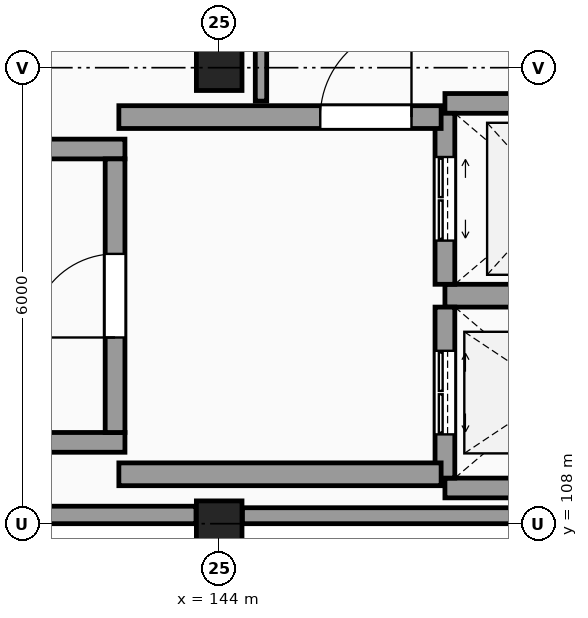
"""IFC4 building model, lengths in metres.
Left out: names, types, materials, properties, quantities, classifications, styles, units other than length and angle.
Written with IfcOpenShell. Run it as: python <this file> out.ifc"""

import sys

from ifc_helpers import new_model, si_unit, direction, frame, frame_2d, origin, origin_2d, place, context, subcontext, project, spatial, rectangle, extrude, element, fill, save


model = new_model("IFC4")
c1 = context("Model", 3, precision=1e-05, world=origin(), true_north=direction((0.0, 1.0)))
c2 = subcontext(c1, "Body", "Model", "MODEL_VIEW")
j1 = project(units=[si_unit("LENGTHUNIT", "METRE"), si_unit("PLANEANGLEUNIT", "RADIAN")], contexts=[c1])
p1 = place(None, origin())
s1 = spatial("IfcSite", under=j1, at=p1, CompositionType="ELEMENT")
p2 = place(p1, origin())
s2 = spatial("IfcBuilding", under=s1, at=p2, CompositionType="ELEMENT")
p3 = place(p2, frame((0.0, 0.0, 34.8)))
s3 = spatial("IfcBuildingStorey", under=s2, at=p3, CompositionType="ELEMENT", Elevation=34.8)
for number, where, z_axis, x_axis in (
    (1, (144.0, 108.0, 0.0), (0.0, 0.0, 1.0), (1.0, 0.0, 0.0)),
    (2, (144.0, 114.0, 0.0), (0.0, 0.0, 1.0), (1.0, 0.0, 0.0)),
):
    element("IfcColumn", number, at=place(p3, frame(where, z_axis=z_axis, x_axis=x_axis)), inside=s3, PredefinedType="COLUMN", context=c2, shape_type="SweptSolid", body=[
        extrude(rectangle(XDim=0.6, YDim=0.6, at=origin_2d()), origin(), (0.0, 0.0, 1.0), 3.3),
    ])
p4 = place(p3, frame((138.28, 108.115, 0.0), z_axis=(0.0, 0.0, 1.0), x_axis=(1.0, 0.0, 0.0)))
e3 = element("IfcWall", 3, at=p4, inside=s3, PredefinedType="SOLIDWALL", context=c2, shape_type="SweptSolid", body=[
    extrude(rectangle(XDim=5.415, YDim=0.23, at=frame_2d((2.708, 0.0))), origin(), (0.0, 0.0, 1.0), 2.42),
])
p5 = place(p3, frame((144.305, 108.105, 0.0), z_axis=(0.0, 0.0, 1.0), x_axis=(1.0, 0.0, 0.0)))
e4 = element("IfcWall", 4, at=p5, inside=s3, PredefinedType="SOLIDWALL", context=c2, shape_type="SweptSolid", body=[
    extrude(rectangle(XDim=5.415, YDim=0.21, at=frame_2d((2.708, 0.0))), origin(), (0.0, 0.0, 1.0), 2.42),
])
for number, where, z_axis, x_axis in (
    (5, (132.04, 109.07, 0.0), (0.0, 0.0, 1.0), (1.0, 0.0, 0.0)),
    (6, (132.04, 112.93, 0.0), (0.0, 0.0, 1.0), (1.0, 0.0, 0.0)),
):
    element("IfcWall", number, at=place(p3, frame(where, z_axis=z_axis, x_axis=x_axis)), inside=s3, PredefinedType="SHEAR", context=c2, shape_type="SweptSolid", body=[
        extrude(rectangle(XDim=10.72, YDim=0.26, at=frame_2d((5.36, 0.0))), origin(), (0.0, 0.0, 1.0), 3.3),
    ])
p6 = place(p3, frame((142.63, 109.2, 0.0), z_axis=(0.0, 0.0, 1.0), x_axis=(0.0, 1.0, 0.0)))
e7 = element("IfcWall", 7, at=p6, inside=s3, PredefinedType="SHEAR", context=c2, shape_type="SweptSolid", body=[
    extrude(rectangle(XDim=3.6, YDim=0.26, at=frame_2d((1.8, 0.0))), origin(), (0.0, 0.0, 1.0), 3.3),
])
p7 = place(p6, frame((1.25, 0.0, 0.0)))
e8 = element("IfcOpeningElement", 8, at=p7, cuts=e7, PredefinedType="OPENING", context=c2, shape_type="SweptSolid", body=[
    extrude(rectangle(XDim=1.1, YDim=2.15, at=frame_2d((0.55, 1.075))), frame((0.0, 0.14, 0.0), z_axis=(0.0, -1.0, 0.0), x_axis=(1.0, 0.0, 0.0)), (0.0, 0.0, 1.0), 0.28),
])
p8 = place(p3, frame((146.97, 108.47, 0.0), z_axis=(0.0, 0.0, 1.0), x_axis=(1.0, 0.0, 0.0)))
e9 = element("IfcWall", 9, at=p8, inside=s3, PredefinedType="SHEAR", context=c2, shape_type="SweptSolid", body=[
    extrude(rectangle(XDim=2.91, YDim=0.26, at=frame_2d((1.455, 0.0))), origin(), (0.0, 0.0, 1.0), 3.3),
])
p9 = place(p3, frame((146.97, 111.0, 0.0), z_axis=(0.0, 0.0, 1.0), x_axis=(1.0, 0.0, 0.0)))
e10 = element("IfcWall", 10, at=p9, inside=s3, PredefinedType="SHEAR", context=c2, shape_type="SweptSolid", body=[
    extrude(rectangle(XDim=2.91, YDim=0.3, at=frame_2d((1.455, 0.0))), origin(), (0.0, 0.0, 1.0), 3.3),
])
p10 = place(p3, frame((146.97, 108.6, 0.0), z_axis=(0.0, 0.0, 1.0), x_axis=(0.0, 1.0, 0.0)))
e11 = element("IfcWall", 11, at=p10, inside=s3, PredefinedType="SHEAR", context=c2, shape_type="SweptSolid", body=[
    extrude(rectangle(XDim=2.25, YDim=0.26, at=frame_2d((1.125, 0.0))), origin(), (0.0, 0.0, 1.0), 3.3),
])
p11 = place(p10, frame((0.575, 0.0, 0.0)))
e12 = element("IfcOpeningElement", 12, at=p11, cuts=e11, PredefinedType="OPENING", context=c2, shape_type="SweptSolid", body=[
    extrude(rectangle(XDim=1.1, YDim=2.2, at=frame_2d((0.55, 1.1))), frame((0.0, 0.14, 0.0), z_axis=(0.0, -1.0, 0.0), x_axis=(1.0, 0.0, 0.0)), (0.0, 0.0, 1.0), 0.28),
])
p12 = place(p3, frame((146.97, 113.53, 0.0), z_axis=(0.0, 0.0, 1.0), x_axis=(1.0, 0.0, 0.0)))
e13 = element("IfcWall", 13, at=p12, inside=s3, PredefinedType="SHEAR", context=c2, shape_type="SweptSolid", body=[
    extrude(rectangle(XDim=2.91, YDim=0.26, at=frame_2d((1.455, 0.0))), origin(), (0.0, 0.0, 1.0), 3.3),
])
p13 = place(p3, frame((146.97, 111.15, 0.0), z_axis=(0.0, 0.0, 1.0), x_axis=(0.0, 1.0, 0.0)))
e14 = element("IfcWall", 14, at=p13, inside=s3, PredefinedType="SHEAR", context=c2, shape_type="SweptSolid", body=[
    extrude(rectangle(XDim=2.25, YDim=0.26, at=frame_2d((1.125, 0.0))), origin(), (0.0, 0.0, 1.0), 3.3),
])
p14 = place(p13, frame((0.575, 0.0, 0.0)))
e15 = element("IfcOpeningElement", 15, at=p14, cuts=e14, PredefinedType="OPENING", context=c2, shape_type="SweptSolid", body=[
    extrude(rectangle(XDim=1.1, YDim=2.2, at=frame_2d((0.55, 1.1))), frame((0.0, 0.14, 0.0), z_axis=(0.0, -1.0, 0.0), x_axis=(1.0, 0.0, 0.0)), (0.0, 0.0, 1.0), 0.28),
])
p15 = place(p3, frame((142.68, 113.35, 0.0), z_axis=(0.0, 0.0, 1.0), x_axis=(1.0, 0.0, 0.0)))
e16 = element("IfcWall", 16, at=p15, inside=s3, PredefinedType="SHEAR", context=c2, shape_type="SweptSolid", body=[
    extrude(rectangle(XDim=4.24, YDim=0.3, at=frame_2d((2.12, 0.0))), origin(), (0.0, 0.0, 1.0), 3.3),
])
p16 = place(p15, frame((2.65, 0.0, 0.0)))
e17 = element("IfcOpeningElement", 17, at=p16, cuts=e16, PredefinedType="OPENING", context=c2, shape_type="SweptSolid", body=[
    extrude(rectangle(XDim=1.2, YDim=2.2, at=frame_2d((0.6, 1.1))), frame((0.0, 0.16, 0.0), z_axis=(0.0, -1.0, 0.0), x_axis=(1.0, 0.0, 0.0)), (0.0, 0.0, 1.0), 0.32),
])
p17 = place(p3, frame((142.68, 108.65, 0.0), z_axis=(0.0, 0.0, 1.0), x_axis=(1.0, 0.0, 0.0)))
e18 = element("IfcWall", 18, at=p17, inside=s3, PredefinedType="SHEAR", context=c2, shape_type="SweptSolid", body=[
    extrude(rectangle(XDim=4.24, YDim=0.3, at=frame_2d((2.12, 0.0))), origin(), (0.0, 0.0, 1.0), 3.3),
])
p18 = place(p3, frame((144.55, 113.56, 0.0), z_axis=(0.0, 0.0, 1.0), x_axis=(0.0, 1.0, 0.0)))
e19 = element("IfcWall", 19, at=p18, inside=s3, PredefinedType="PARTITIONING", context=c2, shape_type="SweptSolid", body=[
    extrude(rectangle(XDim=2.24, YDim=0.15, at=frame_2d((1.12, 0.0))), origin(), (0.0, 0.0, 1.0), 3.07),
])
p19 = place(p7, origin())
e20 = element("IfcDoor", 20, at=p19, inside=s3, OperationType="SINGLE_SWING_LEFT", PredefinedType="DOOR", context=c2, shape_type="SweptSolid", body=[
    extrude(rectangle(XDim=1.1, YDim=2.15, at=frame_2d((0.55, 1.075))), frame((0.0, 0.025, 0.0), z_axis=(0.0, -1.0, 0.0), x_axis=(1.0, 0.0, 0.0)), (0.0, 0.0, 1.0), 0.05),
])
fill(e8, e20)
p20 = place(p11, origin())
e21 = element("IfcDoor", 21, at=p20, inside=s3, OperationType="DOUBLE_DOOR_SLIDING", PredefinedType="DOOR", context=c2, shape_type="SweptSolid", body=[
    extrude(rectangle(XDim=1.1, YDim=2.2, at=frame_2d((0.55, 1.1))), frame((0.0, 0.025, 0.0), z_axis=(0.0, -1.0, 0.0), x_axis=(1.0, 0.0, 0.0)), (0.0, 0.0, 1.0), 0.05),
])
fill(e12, e21)
p21 = place(p14, origin())
e22 = element("IfcDoor", 22, at=p21, inside=s3, OperationType="DOUBLE_DOOR_SLIDING", PredefinedType="DOOR", context=c2, shape_type="SweptSolid", body=[
    extrude(rectangle(XDim=1.1, YDim=2.2, at=frame_2d((0.55, 1.1))), frame((0.0, 0.025, 0.0), z_axis=(0.0, -1.0, 0.0), x_axis=(1.0, 0.0, 0.0)), (0.0, 0.0, 1.0), 0.05),
])
fill(e15, e22)
p22 = place(p16, origin())
e23 = element("IfcDoor", 23, at=p22, inside=s3, OperationType="SINGLE_SWING_RIGHT", PredefinedType="DOOR", context=c2, shape_type="SweptSolid", body=[
    extrude(rectangle(XDim=1.2, YDim=2.2, at=frame_2d((0.6, 1.1))), frame((0.0, 0.025, 0.0), z_axis=(0.0, -1.0, 0.0), x_axis=(1.0, 0.0, 0.0)), (0.0, 0.0, 1.0), 0.05),
])
fill(e17, e23)
save(model, sys.argv[1])
